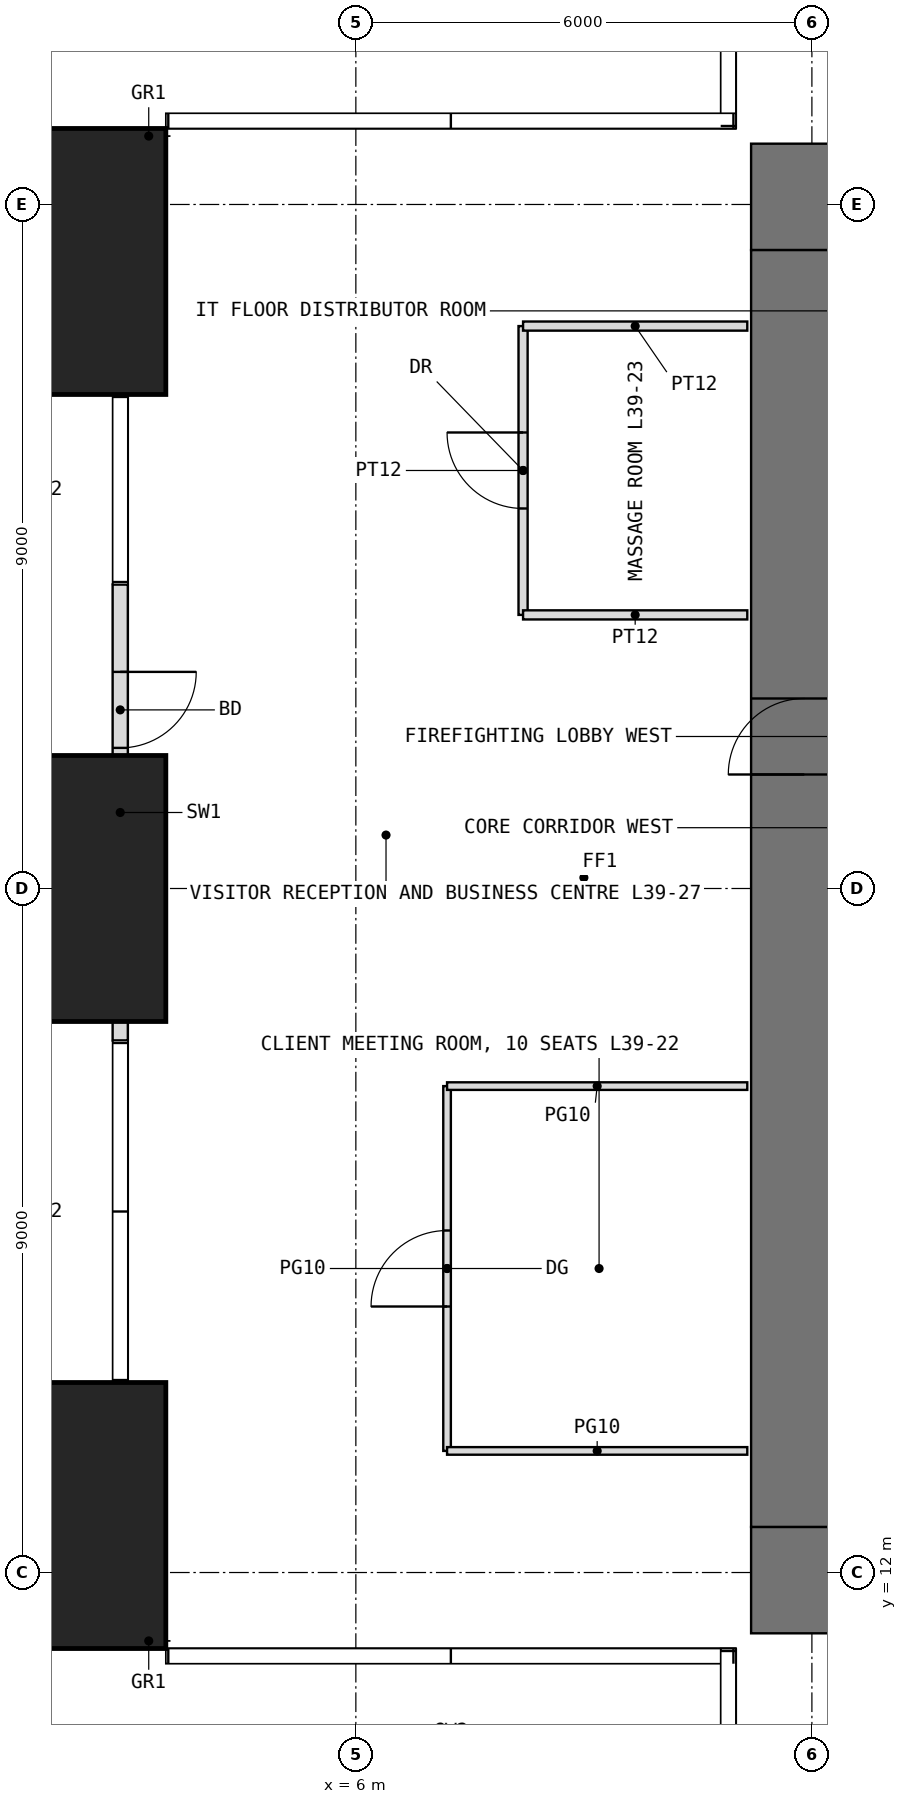
"""IFC4 building model, lengths in metres.
Left out: names, types, materials, properties, quantities, classifications, styles, units other than length and angle.
Written with IfcOpenShell. Run it as: python <this file> out.ifc"""

import sys

from ifc_helpers import new_model, si_unit, direction, frame, frame_2d, origin, origin_2d, place, context, subcontext, project, spatial, rectangle, extrude, element, fill, save


model = new_model("IFC4")
c1 = context("Model", 3, precision=1e-05, world=origin(), true_north=direction((0.0, 1.0)))
c2 = subcontext(c1, "Body", "Model", "MODEL_VIEW")
j1 = project(units=[si_unit("LENGTHUNIT", "METRE"), si_unit("PLANEANGLEUNIT", "RADIAN")], contexts=[c1])
p1 = place(None, origin())
s1 = spatial("IfcSite", under=j1, at=p1, CompositionType="ELEMENT")
p2 = place(p1, origin())
s2 = spatial("IfcBuilding", under=s1, at=p2, CompositionType="ELEMENT")
p3 = place(p2, frame((0.0, 0.0, 165.5)))
s3 = spatial("IfcBuildingStorey", under=s2, at=p3, CompositionType="ELEMENT", Elevation=165.5)
for number, where, z_axis, x_axis in (
    (1, (1.75, 12.75, 0.0), (0.0, 0.0, 1.0), (1.0, 0.0, 0.0)),
    (2, (1.75, 21.0, 0.0), (0.0, 0.0, 1.0), (1.0, 0.0, 0.0)),
    (3, (1.75, 29.25, 0.0), (0.0, 0.0, 1.0), (1.0, 0.0, 0.0)),
):
    element("IfcColumn", number, at=place(p3, frame(where, z_axis=z_axis, x_axis=x_axis)), inside=s3, PredefinedType="COLUMN", context=c2, shape_type="SweptSolid", body=[
        extrude(rectangle(XDim=3.5, YDim=3.5, at=origin_2d()), origin(), (0.0, 0.0, 1.0), 5.0),
    ])
p4 = place(p3, frame((2.9, 25.0, 0.0), z_axis=(0.0, 0.0, 1.0), x_axis=(0.0, -1.0, 0.0)))
e4 = element("IfcWall", 4, at=p4, inside=s3, PredefinedType="USERDEFINED", context=c2, shape_type="SweptSolid", body=[
    extrude(rectangle(XDim=6.0, YDim=0.2, at=frame_2d((3.0, 0.0))), origin(), (0.0, 0.0, 1.0), 4.75),
])
p5 = place(p4, frame((1.15, 0.0, 0.0)))
e5 = element("IfcOpeningElement", 5, at=p5, cuts=e4, PredefinedType="OPENING", context=c2, shape_type="SweptSolid", body=[
    extrude(rectangle(XDim=1.0, YDim=2.4, at=frame_2d((0.5, 1.2))), frame((0.0, 0.11, 0.0), z_axis=(0.0, -1.0, 0.0), x_axis=(1.0, 0.0, 0.0)), (0.0, 0.0, 1.0), 0.22),
])
p6 = place(p3, frame((11.2, 11.9, -0.05), z_axis=(0.0, 0.0, 1.0), x_axis=(1.0, 0.0, 0.0)))
e6 = element("IfcWall", 6, at=p6, inside=s3, PredefinedType="SHEAR", context=c2, shape_type="SweptSolid", body=[
    extrude(rectangle(XDim=19.6, YDim=1.4, at=frame_2d((9.8, 0.0))), origin(), (0.0, 0.0, 1.0), 5.0),
])
p7 = place(p6, frame((8.8, 0.0, 0.05)))
e7 = element("IfcOpeningElement", 7, at=p7, cuts=e6, PredefinedType="OPENING", context=c2, shape_type="SweptSolid", body=[
    extrude(rectangle(XDim=2.0, YDim=2.2, at=frame_2d((1.0, 1.1))), frame((0.0, 0.71, 0.0), z_axis=(0.0, -1.0, 0.0), x_axis=(1.0, 0.0, 0.0)), (0.0, 0.0, 1.0), 1.42),
])
p8 = place(p3, frame((11.2, 30.1, -0.05), z_axis=(0.0, 0.0, 1.0), x_axis=(1.0, 0.0, 0.0)))
e8 = element("IfcWall", 8, at=p8, inside=s3, PredefinedType="SHEAR", context=c2, shape_type="SweptSolid", body=[
    extrude(rectangle(XDim=19.6, YDim=1.4, at=frame_2d((9.8, 0.0))), origin(), (0.0, 0.0, 1.0), 5.0),
])
p9 = place(p8, frame((8.8, 0.0, 0.05)))
e9 = element("IfcOpeningElement", 9, at=p9, cuts=e8, PredefinedType="OPENING", context=c2, shape_type="SweptSolid", body=[
    extrude(rectangle(XDim=2.0, YDim=2.2, at=frame_2d((1.0, 1.1))), frame((0.0, 0.71, 0.0), z_axis=(0.0, -1.0, 0.0), x_axis=(1.0, 0.0, 0.0)), (0.0, 0.0, 1.0), 1.42),
])
p10 = place(p3, frame((11.9, 12.6, -0.05), z_axis=(0.0, 0.0, 1.0), x_axis=(0.0, 1.0, 0.0)))
e10 = element("IfcWall", 10, at=p10, inside=s3, PredefinedType="SHEAR", context=c2, shape_type="SweptSolid", body=[
    extrude(rectangle(XDim=16.8, YDim=1.4, at=frame_2d((8.4, 0.0))), origin(), (0.0, 0.0, 1.0), 5.0),
])
p11 = place(p10, frame((9.9, 0.0, 0.05)))
e11 = element("IfcOpeningElement", 11, at=p11, cuts=e10, PredefinedType="OPENING", context=c2, shape_type="SweptSolid", body=[
    extrude(rectangle(XDim=1.0, YDim=2.2, at=frame_2d((0.5, 1.1))), frame((0.0, 0.71, 0.0), z_axis=(0.0, -1.0, 0.0), x_axis=(1.0, 0.0, 0.0)), (0.0, 0.0, 1.0), 1.42),
])
p12 = place(p3, frame((7.2, 13.6, 0.0), z_axis=(0.0, 0.0, 1.0), x_axis=(0.0, 1.0, 0.0)))
e12 = element("IfcWall", 12, at=p12, inside=s3, PredefinedType="PARTITIONING", context=c2, shape_type="SweptSolid", body=[
    extrude(rectangle(XDim=4.8, YDim=0.1, at=frame_2d((2.4, 0.0))), origin(), (0.0, 0.0, 1.0), 4.75),
])
p13 = place(p12, frame((1.9, 0.0, 0.0)))
e13 = element("IfcOpeningElement", 13, at=p13, cuts=e12, PredefinedType="OPENING", context=c2, shape_type="SweptSolid", body=[
    extrude(rectangle(XDim=1.0, YDim=2.4, at=frame_2d((0.5, 1.2))), frame((0.0, 0.06, 0.0), z_axis=(0.0, -1.0, 0.0), x_axis=(1.0, 0.0, 0.0)), (0.0, 0.0, 1.0), 0.12),
])
for number, where, z_axis, x_axis in (
    (14, (7.2, 13.6, 0.0), (0.0, 0.0, 1.0), (1.0, 0.0, 0.0)),
    (15, (7.2, 18.4, 0.0), (0.0, 0.0, 1.0), (1.0, 0.0, 0.0)),
):
    element("IfcWall", number, at=place(p3, frame(where, z_axis=z_axis, x_axis=x_axis)), inside=s3, PredefinedType="PARTITIONING", context=c2, shape_type="SweptSolid", body=[
        extrude(rectangle(XDim=3.95, YDim=0.1, at=frame_2d((1.975, 0.0))), origin(), (0.0, 0.0, 1.0), 4.75),
    ])
p14 = place(p3, frame((8.2, 24.6, 0.0), z_axis=(0.0, 0.0, 1.0), x_axis=(0.0, 1.0, 0.0)))
e16 = element("IfcWall", 16, at=p14, inside=s3, PredefinedType="PARTITIONING", context=c2, shape_type="SweptSolid", body=[
    extrude(rectangle(XDim=3.8, YDim=0.12, at=frame_2d((1.9, 0.0))), origin(), (0.0, 0.0, 1.0), 4.75),
])
p15 = place(p14, frame((1.4, 0.0, 0.0)))
e17 = element("IfcOpeningElement", 17, at=p15, cuts=e16, PredefinedType="OPENING", context=c2, shape_type="SweptSolid", body=[
    extrude(rectangle(XDim=1.0, YDim=2.2, at=frame_2d((0.5, 1.1))), frame((0.0, 0.07, 0.0), z_axis=(0.0, -1.0, 0.0), x_axis=(1.0, 0.0, 0.0)), (0.0, 0.0, 1.0), 0.14),
])
for number, where, z_axis, x_axis in (
    (18, (8.2, 24.6, 0.0), (0.0, 0.0, 1.0), (1.0, 0.0, 0.0)),
    (19, (8.2, 28.4, 0.0), (0.0, 0.0, 1.0), (1.0, 0.0, 0.0)),
):
    element("IfcWall", number, at=place(p3, frame(where, z_axis=z_axis, x_axis=x_axis)), inside=s3, PredefinedType="PARTITIONING", context=c2, shape_type="SweptSolid", body=[
        extrude(rectangle(XDim=2.95, YDim=0.12, at=frame_2d((1.475, 0.0))), origin(), (0.0, 0.0, 1.0), 4.75),
    ])
p16 = place(p5, origin())
e20 = element("IfcDoor", 20, at=p16, inside=s3, OperationType="SINGLE_SWING_LEFT", PredefinedType="DOOR", context=c2, shape_type="SweptSolid", body=[
    extrude(rectangle(XDim=1.0, YDim=2.4, at=frame_2d((0.5, 1.2))), frame((0.0, 0.025, 0.0), z_axis=(0.0, -1.0, 0.0), x_axis=(1.0, 0.0, 0.0)), (0.0, 0.0, 1.0), 0.05),
])
fill(e5, e20)
p17 = place(p11, origin())
e21 = element("IfcDoor", 21, at=p17, inside=s3, OperationType="SINGLE_SWING_LEFT", PredefinedType="DOOR", context=c2, shape_type="SweptSolid", body=[
    extrude(rectangle(XDim=1.0, YDim=2.2, at=frame_2d((0.5, 1.1))), frame((0.0, 0.025, 0.0), z_axis=(0.0, -1.0, 0.0), x_axis=(1.0, 0.0, 0.0)), (0.0, 0.0, 1.0), 0.05),
])
fill(e11, e21)
p18 = place(p13, origin())
e22 = element("IfcDoor", 22, at=p18, inside=s3, OperationType="SINGLE_SWING_LEFT", PredefinedType="DOOR", context=c2, shape_type="SweptSolid", body=[
    extrude(rectangle(XDim=1.0, YDim=2.4, at=frame_2d((0.5, 1.2))), frame((0.0, 0.025, 0.0), z_axis=(0.0, -1.0, 0.0), x_axis=(1.0, 0.0, 0.0)), (0.0, 0.0, 1.0), 0.05),
])
fill(e13, e22)
p19 = place(p15, origin())
e23 = element("IfcDoor", 23, at=p19, inside=s3, OperationType="SINGLE_SWING_RIGHT", PredefinedType="DOOR", context=c2, shape_type="SweptSolid", body=[
    extrude(rectangle(XDim=1.0, YDim=2.2, at=frame_2d((0.5, 1.1))), frame((0.0, 0.025, 0.0), z_axis=(0.0, -1.0, 0.0), x_axis=(1.0, 0.0, 0.0)), (0.0, 0.0, 1.0), 0.05),
])
fill(e17, e23)
save(model, sys.argv[1])
